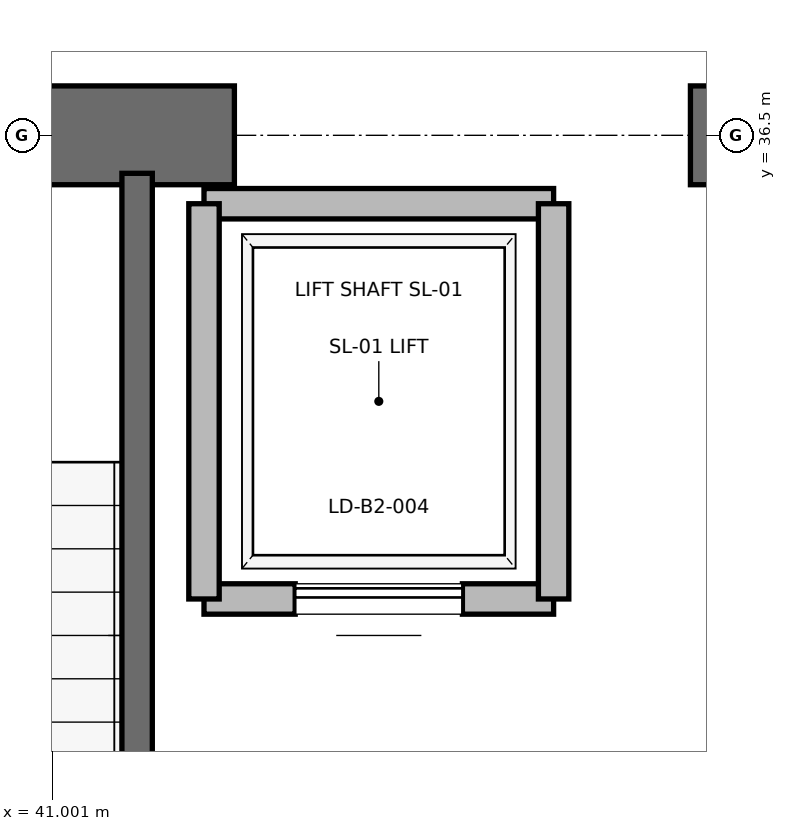
"""IFC4 building model, lengths in metres.
Left out: names, types, materials, properties, quantities, classifications, styles, units other than length and angle.
Written with IfcOpenShell. Run it as: python <this file> out.ifc"""

import sys

from ifc_helpers import new_model, si_unit, direction, frame, frame_2d, origin, place, context, subcontext, project, spatial, rectangle, extrude, element, fill, save


model = new_model("IFC4")
c1 = context("Model", 3, precision=1e-05, world=origin(), true_north=direction((0.0, 1.0)))
c2 = subcontext(c1, "Body", "Model", "MODEL_VIEW")
j1 = project(units=[si_unit("LENGTHUNIT", "METRE"), si_unit("PLANEANGLEUNIT", "RADIAN")], contexts=[c1])
p1 = place(None, origin())
s1 = spatial("IfcSite", under=j1, at=p1, CompositionType="ELEMENT")
p2 = place(p1, origin())
s2 = spatial("IfcBuilding", under=s1, at=p2, CompositionType="ELEMENT")
p3 = place(p2, frame((0.0, 0.0, -9.0)))
s3 = spatial("IfcBuildingStorey", under=s2, at=p3, CompositionType="ELEMENT", Elevation=-9.0)
p4 = place(p3, frame((37.8, 36.5, -0.3), z_axis=(0.0, 0.0, 1.0), x_axis=(1.0, 0.0, 0.0)))
e1 = element("IfcWall", 1, at=p4, inside=s3, PredefinedType="SHEAR", context=c2, shape_type="SweptSolid", body=[
    extrude(rectangle(XDim=4.4, YDim=0.65, at=frame_2d((2.2, 0.0))), origin(), (0.0, 0.0, 1.0), 4.5),
])
p5 = place(p4, frame((1.65, 0.0, 0.3)))
e2 = element("IfcOpeningElement", 2, at=p5, cuts=e1, PredefinedType="OPENING", context=c2, shape_type="SweptSolid", body=[
    extrude(rectangle(XDim=1.1, YDim=2.15, at=frame_2d((0.55, 1.075))), frame((0.0, 0.325, 0.0), z_axis=(0.0, -1.0, 0.0), x_axis=(1.0, 0.0, 0.0)), (0.0, 0.0, 1.0), 0.65),
])
p6 = place(p3, frame((45.2, 36.5, -0.3), z_axis=(0.0, 0.0, 1.0), x_axis=(1.0, 0.0, 0.0)))
e3 = element("IfcWall", 3, at=p6, inside=s3, PredefinedType="SHEAR", context=c2, shape_type="SweptSolid", body=[
    extrude(rectangle(XDim=5.8, YDim=0.65, at=frame_2d((2.9, 0.0))), origin(), (0.0, 0.0, 1.0), 4.5),
])
p7 = place(p3, frame((41.56, 27.68, -0.3), z_axis=(0.0, 0.0, 1.0), x_axis=(0.0, 1.0, 0.0)))
e4 = element("IfcWall", 4, at=p7, inside=s3, PredefinedType="SOLIDWALL", context=c2, shape_type="SweptSolid", body=[
    extrude(rectangle(XDim=8.57, YDim=0.2, at=frame_2d((4.285, 0.0))), origin(), (0.0, 0.0, 1.0), 4.5),
])
p8 = place(p3, frame((42.0, 33.45, 0.0), z_axis=(0.0, 0.0, 1.0), x_axis=(1.0, 0.0, 0.0)))
e5 = element("IfcWall", 5, at=p8, inside=s3, PredefinedType="SOLIDWALL", context=c2, shape_type="SweptSolid", body=[
    extrude(rectangle(XDim=2.3, YDim=0.2, at=frame_2d((1.15, 0.0))), origin(), (0.0, 0.0, 1.0), 4.2),
])
p9 = place(p8, frame((0.6, 0.0, 0.0)))
e6 = element("IfcOpeningElement", 6, at=p9, cuts=e5, PredefinedType="OPENING", context=c2, shape_type="SweptSolid", body=[
    extrude(rectangle(XDim=1.1, YDim=2.2, at=frame_2d((0.55, 1.1))), frame((0.0, 0.1, 0.0), z_axis=(0.0, -1.0, 0.0), x_axis=(1.0, 0.0, 0.0)), (0.0, 0.0, 1.0), 0.2),
])
p10 = place(p3, frame((44.3, 36.05, 0.0), z_axis=(0.0, 0.0, 1.0), x_axis=(-1.0, 0.0, 0.0)))
e7 = element("IfcWall", 7, at=p10, inside=s3, PredefinedType="SOLIDWALL", context=c2, shape_type="SweptSolid", body=[
    extrude(rectangle(XDim=2.3, YDim=0.2, at=frame_2d((1.15, 0.0))), origin(), (0.0, 0.0, 1.0), 2.98),
])
for number, where, z_axis, x_axis in (
    (8, (42.0, 36.05, 0.0), (0.0, 0.0, 1.0), (0.0, -1.0, 0.0)),
    (9, (44.3, 33.45, 0.0), (0.0, 0.0, 1.0), (0.0, 1.0, 0.0)),
):
    element("IfcWall", number, at=place(p3, frame(where, z_axis=z_axis, x_axis=x_axis)), inside=s3, PredefinedType="SOLIDWALL", context=c2, shape_type="SweptSolid", body=[
        extrude(rectangle(XDim=2.6, YDim=0.2, at=frame_2d((1.3, 0.0))), origin(), (0.0, 0.0, 1.0), 2.98),
    ])
p11 = place(p9, origin())
e10 = element("IfcDoor", 10, at=p11, inside=s3, OperationType="SLIDING_TO_RIGHT", PredefinedType="DOOR", context=c2, shape_type="SweptSolid", body=[
    extrude(rectangle(XDim=1.1, YDim=2.2, at=frame_2d((0.55, 1.1))), frame((0.0, 0.025, 0.0), z_axis=(0.0, -1.0, 0.0), x_axis=(1.0, 0.0, 0.0)), (0.0, 0.0, 1.0), 0.05),
])
fill(e6, e10)
save(model, sys.argv[1])
